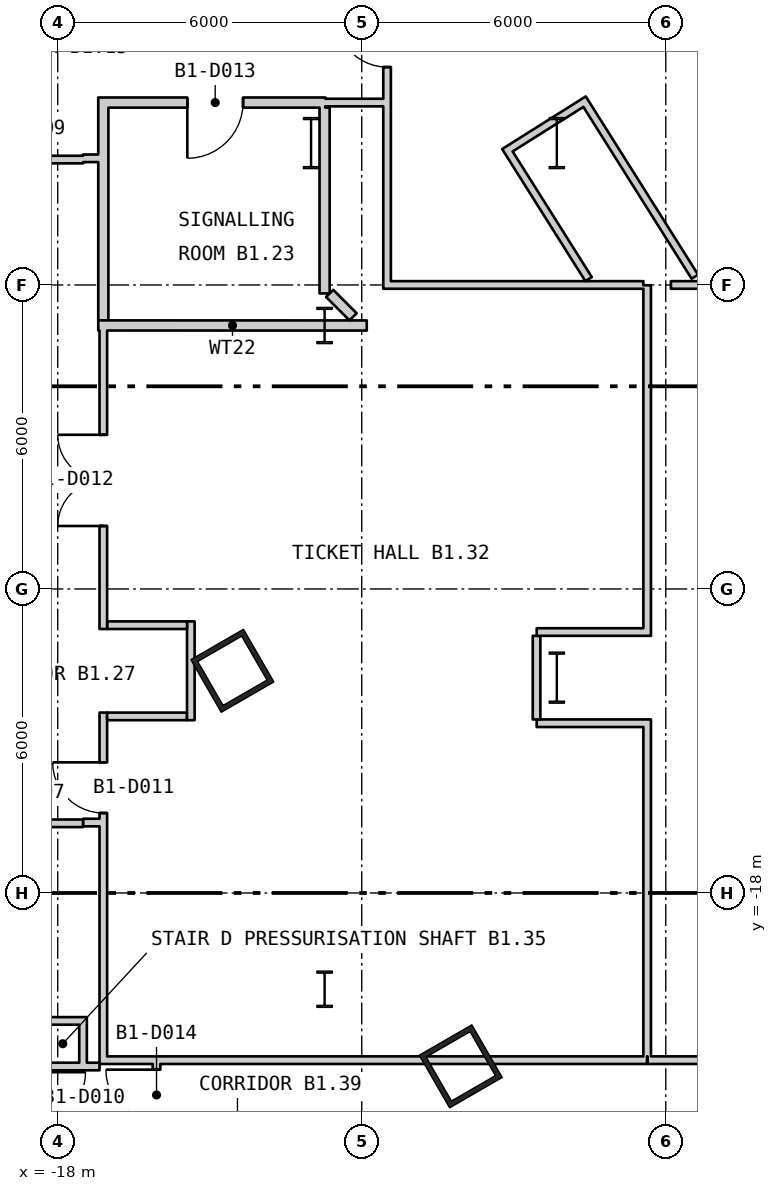
"""IFC4 building model, lengths in metres.
Left out: names, types, materials, properties, quantities, classifications, styles, units other than length and angle.
Written with IfcOpenShell. Run it as: python <this file> out.ifc"""

import sys

from ifc_helpers import new_model, si_unit, direction, frame, frame_2d, origin, origin_2d, place, context, subcontext, project, spatial, rectangle, hollow_rectangle, i_section, extrude, element, fill, save


model = new_model("IFC4")
c1 = context("Model", 3, precision=1e-05, world=origin(), true_north=direction((0.0, 1.0)))
c2 = subcontext(c1, "Body", "Model", "MODEL_VIEW")
j1 = project(units=[si_unit("LENGTHUNIT", "METRE"), si_unit("PLANEANGLEUNIT", "RADIAN")], contexts=[c1])
p1 = place(None, origin())
s1 = spatial("IfcSite", under=j1, at=p1, CompositionType="ELEMENT")
p2 = place(p1, origin())
s2 = spatial("IfcBuilding", under=s1, at=p2, CompositionType="ELEMENT")
p3 = place(p2, frame((0.0, 0.0, -5.7)))
s3 = spatial("IfcBuildingStorey", under=s2, at=p3, CompositionType="ELEMENT", Elevation=-5.7)
for number, where, z_axis, x_axis in (
    (1, (-14.553, -13.615, 0.0), (0.0, 0.0, 1.0), (0.5, -0.866, 0.0)),
    (2, (-10.046, -21.422, 0.0), (0.0, 0.0, 1.0), (0.5, -0.866, 0.0)),
):
    element("IfcColumn", number, at=place(p3, frame(where, z_axis=z_axis, x_axis=x_axis)), inside=s3, PredefinedType="COLUMN", context=c2, shape_type="SweptSolid", body=[
        extrude(hollow_rectangle(XDim=1.2, YDim=1.2, WallThickness=0.1, at=origin_2d()), origin(), (0.0, 0.0, 1.0), 5.7),
    ])
for number, where, z_axis, x_axis in (
    (3, (-8.15, -3.2, 0.0), (0.0, 0.0, 1.0), (1.0, 0.0, 0.0)),
    (4, (-8.15, -13.75, 0.0), (0.0, 0.0, 1.0), (1.0, 0.0, 0.0)),
    (5, (-13.0, -3.2, 0.0), (0.0, 0.0, 1.0), (1.0, 0.0, 0.0)),
):
    element("IfcColumn", number, at=place(p3, frame(where, z_axis=z_axis, x_axis=x_axis)), inside=s3, PredefinedType="COLUMN", context=c2, shape_type="SweptSolid", body=[
        extrude(i_section(OverallWidth=0.302, OverallDepth=1.008, WebThickness=0.021, FlangeThickness=0.04, at=origin_2d()), origin(), (0.0, 0.0, 1.0), 5.7),
    ])
for number, where, z_axis, x_axis in (
    (6, (-12.733, -6.8, 0.0), (0.0, 0.0, 1.0), (1.0, 0.0, 0.0)),
    (7, (-12.733, -19.9, 0.0), (0.0, 0.0, 1.0), (1.0, 0.0, 0.0)),
):
    element("IfcColumn", number, at=place(p3, frame(where, z_axis=z_axis, x_axis=x_axis)), inside=s3, PredefinedType="COLUMN", context=c2, shape_type="SweptSolid", body=[
        extrude(i_section(OverallWidth=0.304, OverallDepth=0.716, WebThickness=0.021, FlangeThickness=0.04, at=origin_2d()), origin(), (0.0, 0.0, 1.0), 5.25),
    ])
p4 = place(p3, frame((-19.825, -16.625, 0.0), z_axis=(0.0, 0.0, 1.0), x_axis=(1.0, 0.0, 0.0)))
e8 = element("IfcWall", 8, at=p4, inside=s3, PredefinedType="PARTITIONING", context=c2, shape_type="SweptSolid", body=[
    extrude(rectangle(XDim=2.324, YDim=0.15, at=frame_2d((1.162, 0.0))), origin(), (0.0, 0.0, 1.0), 5.25),
])
p5 = place(p4, frame((0.662, 0.0, 0.0)))
e9 = element("IfcOpeningElement", 9, at=p5, cuts=e8, PredefinedType="OPENING", context=c2, shape_type="SweptSolid", body=[
    extrude(rectangle(XDim=1.0, YDim=2.1, at=frame_2d((0.5, 1.05))), frame((0.0, 0.085, 0.0), z_axis=(0.0, -1.0, 0.0), x_axis=(1.0, 0.0, 0.0)), (0.0, 0.0, 1.0), 0.17),
])
p6 = place(p3, frame((-19.8, -3.525, 0.0), z_axis=(0.0, 0.0, 1.0), x_axis=(1.0, 0.0, 0.0)))
e10 = element("IfcWall", 10, at=p6, inside=s3, PredefinedType="PARTITIONING", context=c2, shape_type="SweptSolid", body=[
    extrude(rectangle(XDim=2.3, YDim=0.15, at=frame_2d((1.15, 0.0))), origin(), (0.0, 0.0, 1.0), 5.25),
])
p7 = place(p6, frame((0.65, 0.0, 0.0)))
e11 = element("IfcOpeningElement", 11, at=p7, cuts=e10, PredefinedType="OPENING", context=c2, shape_type="SweptSolid", body=[
    extrude(rectangle(XDim=1.0, YDim=2.1, at=frame_2d((0.5, 1.05))), frame((0.0, 0.085, 0.0), z_axis=(0.0, -1.0, 0.0), x_axis=(1.0, 0.0, 0.0)), (0.0, 0.0, 1.0), 0.17),
])
for number, where, z_axis, x_axis in (
    (12, (-18.225, -21.425, 0.0), (0.0, 0.0, 1.0), (1.0, 0.0, 0.0)),
    (13, (-18.225, -20.525, 0.0), (0.0, 0.0, 1.0), (1.0, 0.0, 0.0)),
):
    element("IfcWall", number, at=place(p3, frame(where, z_axis=z_axis, x_axis=x_axis)), inside=s3, PredefinedType="PARTITIONING", context=c2, shape_type="SweptSolid", body=[
        extrude(rectangle(XDim=0.65, YDim=0.15, at=frame_2d((0.325, 0.0))), origin(), (0.0, 0.0, 1.0), 5.25),
    ])
p8 = place(p3, frame((-17.5, -21.5, 0.0), z_axis=(0.0, 0.0, 1.0), x_axis=(0.0, 1.0, 0.0)))
e14 = element("IfcWall", 14, at=p8, inside=s3, PredefinedType="PARTITIONING", context=c2, shape_type="SweptSolid", body=[
    extrude(rectangle(XDim=1.05, YDim=0.15, at=frame_2d((0.525, 0.0))), origin(), (0.0, 0.0, 1.0), 5.25),
])
p9 = place(p3, frame((-17.5, -16.61, 0.0), z_axis=(0.0, 0.0, 1.0), x_axis=(1.0, 0.0, 0.0)))
e15 = element("IfcWall", 15, at=p9, inside=s3, PredefinedType="PARTITIONING", context=c2, shape_type="SweptSolid", body=[
    extrude(rectangle(XDim=0.325, YDim=0.15, at=frame_2d((0.163, 0.0))), origin(), (0.0, 0.0, 1.0), 5.25),
])
p10 = place(p3, frame((-17.5, -3.5, 0.0), z_axis=(0.0, 0.0, 1.0), x_axis=(1.0, 0.0, 0.0)))
e16 = element("IfcWall", 16, at=p10, inside=s3, PredefinedType="PARTITIONING", context=c2, shape_type="SweptSolid", body=[
    extrude(rectangle(XDim=0.3, YDim=0.15, at=frame_2d((0.15, 0.0))), origin(), (0.0, 0.0, 1.0), 5.25),
])
p11 = place(p3, frame((-17.425, -21.425, 0.0), z_axis=(0.0, 0.0, 1.0), x_axis=(1.0, 0.0, 0.0)))
e17 = element("IfcWall", 17, at=p11, inside=s3, PredefinedType="PARTITIONING", context=c2, shape_type="SweptSolid", body=[
    extrude(rectangle(XDim=0.25, YDim=0.15, at=frame_2d((0.125, 0.0))), origin(), (0.0, 0.0, 1.0), 5.25),
])
p12 = place(p3, frame((-17.2, -6.799, 0.0), z_axis=(0.0, 0.0, 1.0), x_axis=(0.999999982193, -0.000188714848, 0.0)))
e18 = element("IfcWall", 18, at=p12, inside=s3, PredefinedType="PARTITIONING", context=c2, shape_type="SweptSolid", body=[
    extrude(rectangle(XDim=5.299, YDim=0.2, at=frame_2d((2.65, 0.0))), origin(), (0.0, 0.0, 1.0), 5.25),
])
p13 = place(p3, frame((-17.175, -21.3, 0.0), z_axis=(0.0, 0.0, 1.0), x_axis=(1.0, 0.0, 0.0)))
e19 = element("IfcWall", 19, at=p13, inside=s3, PredefinedType="PARTITIONING", context=c2, shape_type="SweptSolid", body=[
    extrude(rectangle(XDim=10.805, YDim=0.15, at=frame_2d((5.402, 0.0))), origin(), (0.0, 0.0, 1.0), 5.25),
])
p14 = place(p3, frame((-17.1, -21.225, 0.0), z_axis=(0.0, 0.0, 1.0), x_axis=(0.0, 1.0, 0.0)))
e20 = element("IfcWall", 20, at=p14, inside=s3, PredefinedType="PARTITIONING", context=c2, shape_type="SweptSolid", body=[
    extrude(rectangle(XDim=6.785, YDim=0.15, at=frame_2d((3.393, 0.0))), origin(), (0.0, 0.0, 1.0), 5.25),
])
p15 = place(p14, frame((4.803, 0.0, 0.0)))
e21 = element("IfcOpeningElement", 21, at=p15, cuts=e20, PredefinedType="OPENING", context=c2, shape_type="SweptSolid", body=[
    extrude(rectangle(XDim=1.0, YDim=2.1, at=frame_2d((0.5, 1.05))), frame((0.0, 0.085, 0.0), z_axis=(0.0, -1.0, 0.0), x_axis=(1.0, 0.0, 0.0)), (0.0, 0.0, 1.0), 0.17),
])
p16 = place(p3, frame((-17.1, -12.79, 0.0), z_axis=(0.0, 0.0, 1.0), x_axis=(0.0, 1.0, 0.0)))
e22 = element("IfcWall", 22, at=p16, inside=s3, PredefinedType="PARTITIONING", context=c2, shape_type="SweptSolid", body=[
    extrude(rectangle(XDim=5.891, YDim=0.15, at=frame_2d((2.946, 0.0))), origin(), (0.0, 0.0, 1.0), 5.25),
])
p17 = place(p16, frame((2.033, 0.0, 0.0)))
e23 = element("IfcOpeningElement", 23, at=p17, cuts=e22, PredefinedType="OPENING", context=c2, shape_type="SweptSolid", body=[
    extrude(rectangle(XDim=1.8, YDim=2.1, at=frame_2d((0.9, 1.05))), frame((0.0, 0.085, 0.0), z_axis=(0.0, -1.0, 0.0), x_axis=(1.0, 0.0, 0.0)), (0.0, 0.0, 1.0), 0.17),
])
p18 = place(p3, frame((-17.1, -6.699, 0.0), z_axis=(0.0, 0.0, 1.0), x_axis=(0.0, 1.0, 0.0)))
e24 = element("IfcWall", 24, at=p18, inside=s3, PredefinedType="PARTITIONING", context=c2, shape_type="SweptSolid", body=[
    extrude(rectangle(XDim=4.399, YDim=0.2, at=frame_2d((2.2, 0.0))), origin(), (0.0, 0.0, 1.0), 5.25),
])
for number, where, z_axis, x_axis in (
    (25, (-17.025, -14.515, 0.0), (0.0, 0.0, 1.0), (1.0, 0.0, 0.0)),
    (26, (-17.025, -12.715, 0.0), (0.0, 0.0, 1.0), (1.0, 0.0, 0.0)),
):
    element("IfcWall", number, at=place(p3, frame(where, z_axis=z_axis, x_axis=x_axis)), inside=s3, PredefinedType="PARTITIONING", context=c2, shape_type="SweptSolid", body=[
        extrude(rectangle(XDim=1.577, YDim=0.15, at=frame_2d((0.788, 0.0))), origin(), (0.0, 0.0, 1.0), 5.25),
    ])
p19 = place(p3, frame((-17.0, -2.4, 0.0), z_axis=(0.0, 0.0, 1.0), x_axis=(1.0, 0.0, 0.0)))
e27 = element("IfcWall", 27, at=p19, inside=s3, PredefinedType="PARTITIONING", context=c2, shape_type="SweptSolid", body=[
    extrude(rectangle(XDim=4.279, YDim=0.2, at=frame_2d((2.139, 0.0))), origin(), (0.0, 0.0, 1.0), 5.25),
])
p20 = place(p19, frame((1.558, 0.0, 0.0)))
e28 = element("IfcOpeningElement", 28, at=p20, cuts=e27, PredefinedType="OPENING", context=c2, shape_type="SweptSolid", body=[
    extrude(rectangle(XDim=1.1, YDim=2.1, at=frame_2d((0.55, 1.05))), frame((0.0, 0.11, 0.0), z_axis=(0.0, -1.0, 0.0), x_axis=(1.0, 0.0, 0.0)), (0.0, 0.0, 1.0), 0.22),
])
p21 = place(p3, frame((-16.05, -23.55, 0.0), z_axis=(0.0, 0.0, 1.0), x_axis=(0.0, 1.0, 0.0)))
e29 = element("IfcWall", 29, at=p21, inside=s3, PredefinedType="PARTITIONING", context=c2, shape_type="SweptSolid", body=[
    extrude(rectangle(XDim=2.175, YDim=0.15, at=frame_2d((1.087, 0.0))), origin(), (0.0, 0.0, 1.0), 5.25),
])
p22 = place(p21, frame((1.063, 0.0, 0.0)))
e30 = element("IfcOpeningElement", 30, at=p22, cuts=e29, PredefinedType="OPENING", context=c2, shape_type="SweptSolid", body=[
    extrude(rectangle(XDim=1.0, YDim=2.1, at=frame_2d((0.5, 1.05))), frame((0.0, 0.085, 0.0), z_axis=(0.0, -1.0, 0.0), x_axis=(1.0, 0.0, 0.0)), (0.0, 0.0, 1.0), 0.17),
])
p23 = place(p3, frame((-15.373, -14.59, 0.0), z_axis=(0.0, 0.0, 1.0), x_axis=(0.0, 1.0, 0.0)))
e31 = element("IfcWall", 31, at=p23, inside=s3, PredefinedType="PARTITIONING", context=c2, shape_type="SweptSolid", body=[
    extrude(rectangle(XDim=1.95, YDim=0.15, at=frame_2d((0.975, 0.0))), origin(), (0.0, 0.0, 1.0), 5.25),
])
p24 = place(p3, frame((-12.733, -6.167, 0.0), z_axis=(0.0, 0.0, 1.0), x_axis=(0.0, 1.0, 0.0)))
e32 = element("IfcWall", 32, at=p24, inside=s3, PredefinedType="PARTITIONING", context=c2, shape_type="SweptSolid", body=[
    extrude(rectangle(XDim=3.667, YDim=0.2, at=frame_2d((1.833, 0.0))), origin(), (0.0, 0.0, 1.0), 5.25),
])
p25 = place(p3, frame((-12.721, -2.4, 0.0), z_axis=(0.0, 0.0, 1.0), x_axis=(1.0, 0.0, 0.0)))
e33 = element("IfcWall", 33, at=p25, inside=s3, PredefinedType="PARTITIONING", context=c2, shape_type="SweptSolid", body=[
    extrude(rectangle(XDim=1.146, YDim=0.15, at=frame_2d((0.573, 0.0))), origin(), (0.0, 0.0, 1.0), 5.25),
])
p26 = place(p3, frame((-12.633, -6.167, 0.0), z_axis=(0.0, 0.0, 1.0), x_axis=(0.707106781187, -0.707106781187, 0.0)))
e34 = element("IfcWall", 34, at=p26, inside=s3, PredefinedType="PARTITIONING", context=c2, shape_type="SweptSolid", body=[
    extrude(rectangle(XDim=0.653, YDim=0.2, at=frame_2d((0.327, 0.0))), origin(), (0.0, 0.0, 1.0), 5.25),
])
p27 = place(p3, frame((-11.5, -6.075, 0.0), z_axis=(0.0, 0.0, 1.0), x_axis=(0.0, 1.0, 0.0)))
e35 = element("IfcWall", 35, at=p27, inside=s3, PredefinedType="PARTITIONING", context=c2, shape_type="SweptSolid", body=[
    extrude(rectangle(XDim=6.075, YDim=0.15, at=frame_2d((3.038, 0.0))), origin(), (0.0, 0.0, 1.0), 5.25),
])
p28 = place(p27, frame((4.375, 0.0, 0.0)))
e36 = element("IfcOpeningElement", 36, at=p28, cuts=e35, PredefinedType="OPENING", context=c2, shape_type="SweptSolid", body=[
    extrude(rectangle(XDim=1.0, YDim=2.1, at=frame_2d((0.5, 1.05))), frame((0.0, 0.085, 0.0), z_axis=(0.0, -1.0, 0.0), x_axis=(1.0, 0.0, 0.0)), (0.0, 0.0, 1.0), 0.17),
])
p29 = place(p3, frame((-11.425, -6.0, 0.0), z_axis=(0.0, 0.0, 1.0), x_axis=(1.0, 0.0, 0.0)))
e37 = element("IfcWall", 37, at=p29, inside=s3, PredefinedType="PARTITIONING", context=c2, shape_type="SweptSolid", body=[
    extrude(rectangle(XDim=4.983, YDim=0.15, at=frame_2d((2.491, 0.0))), origin(), (0.0, 0.0, 1.0), 5.25),
])
p30 = place(p3, frame((-9.165, -3.278, 0.0), z_axis=(0.0, 0.0, 1.0), x_axis=(0.532942389679, -0.846151528559, 0.0)))
e38 = element("IfcWall", 38, at=p30, inside=s3, PredefinedType="PARTITIONING", context=c2, shape_type="SweptSolid", body=[
    extrude(rectangle(XDim=3.081, YDim=0.15, at=frame_2d((1.54, 0.0))), origin(), (0.0, 0.0, 1.0), 5.25),
])
p31 = place(p3, frame((-9.062, -3.301, 0.0), z_axis=(0.0, 0.0, 1.0), x_axis=(0.846394682691, 0.53255613893, 0.0)))
e39 = element("IfcWall", 39, at=p31, inside=s3, PredefinedType="PARTITIONING", context=c2, shape_type="SweptSolid", body=[
    extrude(rectangle(XDim=1.651, YDim=0.15, at=frame_2d((0.825, 0.0))), origin(), (0.0, 0.0, 1.0), 5.25),
])
p32 = place(p3, frame((-8.55, -14.575, 0.0), z_axis=(0.0, 0.0, 1.0), x_axis=(0.0, 1.0, 0.0)))
e40 = element("IfcWall", 40, at=p32, inside=s3, PredefinedType="PARTITIONING", context=c2, shape_type="SweptSolid", body=[
    extrude(rectangle(XDim=1.65, YDim=0.15, at=frame_2d((0.825, 0.0))), origin(), (0.0, 0.0, 1.0), 5.25),
])
for number, where, z_axis, x_axis in (
    (41, (-8.547, -14.65, 0.0), (0.0, 0.0, 1.0), (1.0, 0.0, 0.0)),
    (42, (-8.547, -12.85, 0.0), (0.0, 0.0, 1.0), (1.0, 0.0, 0.0)),
):
    element("IfcWall", number, at=place(p3, frame(where, z_axis=z_axis, x_axis=x_axis)), inside=s3, PredefinedType="PARTITIONING", context=c2, shape_type="SweptSolid", body=[
        extrude(rectangle(XDim=2.105, YDim=0.15, at=frame_2d((1.052, 0.0))), origin(), (0.0, 0.0, 1.0), 5.25),
    ])
p33 = place(p3, frame((-7.642, -2.319, 0.0), z_axis=(0.0, 0.0, 1.0), x_axis=(0.532979114911, -0.846128396326, 0.0)))
e43 = element("IfcWall", 43, at=p33, inside=s3, PredefinedType="PARTITIONING", context=c2, shape_type="SweptSolid", body=[
    extrude(rectangle(XDim=4.158, YDim=0.15, at=frame_2d((2.079, 0.0))), origin(), (0.0, 0.0, 1.0), 5.25),
])
p34 = place(p3, frame((-6.367, -21.225, 0.0), z_axis=(0.0, 0.0, 1.0), x_axis=(0.0, 1.0, 0.0)))
e44 = element("IfcWall", 44, at=p34, inside=s3, PredefinedType="PARTITIONING", context=c2, shape_type="SweptSolid", body=[
    extrude(rectangle(XDim=6.65, YDim=0.15, at=frame_2d((3.325, 0.0))), origin(), (0.0, 0.0, 1.0), 5.25),
])
p35 = place(p3, frame((-6.367, -12.925, 0.0), z_axis=(0.0, 0.0, 1.0), x_axis=(0.0, 1.0, 0.0)))
e45 = element("IfcWall", 45, at=p35, inside=s3, PredefinedType="PARTITIONING", context=c2, shape_type="SweptSolid", body=[
    extrude(rectangle(XDim=6.919, YDim=0.15, at=frame_2d((3.459, 0.0))), origin(), (0.0, 0.0, 1.0), 5.25),
])
p36 = place(p3, frame((-6.361, -21.3, 0.0), z_axis=(0.0, 0.0, 1.0), x_axis=(1.0, 0.0, 0.0)))
e46 = element("IfcWall", 46, at=p36, inside=s3, PredefinedType="PARTITIONING", context=c2, shape_type="SweptSolid", body=[
    extrude(rectangle(XDim=4.661, YDim=0.15, at=frame_2d((2.33, 0.0))), origin(), (0.0, 0.0, 1.0), 5.25),
])
p37 = place(p3, frame((-5.899, -6.0, 0.0), z_axis=(0.0, 0.0, 1.0), x_axis=(1.0, 0.0, 0.0)))
e47 = element("IfcWall", 47, at=p37, inside=s3, PredefinedType="PARTITIONING", context=c2, shape_type="SweptSolid", body=[
    extrude(rectangle(XDim=13.224, YDim=0.15, at=frame_2d((6.612, 0.0))), origin(), (0.0, 0.0, 1.0), 5.25),
])
p38 = place(p37, frame((4.985, 0.0, 0.0)))
e48 = element("IfcOpeningElement", 48, at=p38, cuts=e47, PredefinedType="OPENING", context=c2, shape_type="SweptSolid", body=[
    extrude(rectangle(XDim=1.8, YDim=2.1, at=frame_2d((0.9, 1.05))), frame((0.0, 0.085, 0.0), z_axis=(0.0, -1.0, 0.0), x_axis=(1.0, 0.0, 0.0)), (0.0, 0.0, 1.0), 0.17),
])
p39 = place(p15, origin())
e49 = element("IfcDoor", 49, at=p39, inside=s3, OperationType="SINGLE_SWING_LEFT", PredefinedType="DOOR", context=c2, shape_type="SweptSolid", body=[
    extrude(rectangle(XDim=1.0, YDim=2.1, at=frame_2d((0.5, 1.05))), frame((0.0, 0.025, 0.0), z_axis=(0.0, -1.0, 0.0), x_axis=(1.0, 0.0, 0.0)), (0.0, 0.0, 1.0), 0.05),
])
fill(e21, e49)
p40 = place(p17, origin())
e50 = element("IfcDoor", 50, at=p40, inside=s3, OperationType="DOUBLE_DOOR_SINGLE_SWING", PredefinedType="DOOR", context=c2, shape_type="SweptSolid", body=[
    extrude(rectangle(XDim=1.8, YDim=2.1, at=frame_2d((0.9, 1.05))), frame((0.0, 0.025, 0.0), z_axis=(0.0, -1.0, 0.0), x_axis=(1.0, 0.0, 0.0)), (0.0, 0.0, 1.0), 0.05),
])
fill(e23, e50)
p41 = place(p20, origin())
e51 = element("IfcDoor", 51, at=p41, inside=s3, OperationType="SINGLE_SWING_LEFT", PredefinedType="DOOR", context=c2, shape_type="SweptSolid", body=[
    extrude(rectangle(XDim=1.1, YDim=2.1, at=frame_2d((0.55, 1.05))), frame((0.0, 0.025, 0.0), z_axis=(0.0, -1.0, 0.0), x_axis=(1.0, 0.0, 0.0)), (0.0, 0.0, 1.0), 0.05),
])
fill(e28, e51)
p42 = place(p22, origin())
e52 = element("IfcDoor", 52, at=p42, inside=s3, OperationType="SINGLE_SWING_LEFT", PredefinedType="DOOR", context=c2, shape_type="SweptSolid", body=[
    extrude(rectangle(XDim=1.0, YDim=2.1, at=frame_2d((0.5, 1.05))), frame((0.0, 0.025, 0.0), z_axis=(0.0, -1.0, 0.0), x_axis=(1.0, 0.0, 0.0)), (0.0, 0.0, 1.0), 0.05),
])
fill(e30, e52)
p43 = place(p28, origin())
e53 = element("IfcDoor", 53, at=p43, inside=s3, OperationType="SINGLE_SWING_LEFT", PredefinedType="DOOR", context=c2, shape_type="SweptSolid", body=[
    extrude(rectangle(XDim=1.0, YDim=2.1, at=frame_2d((0.5, 1.05))), frame((0.0, 0.025, 0.0), z_axis=(0.0, -1.0, 0.0), x_axis=(1.0, 0.0, 0.0)), (0.0, 0.0, 1.0), 0.05),
])
fill(e36, e53)
save(model, sys.argv[1])
